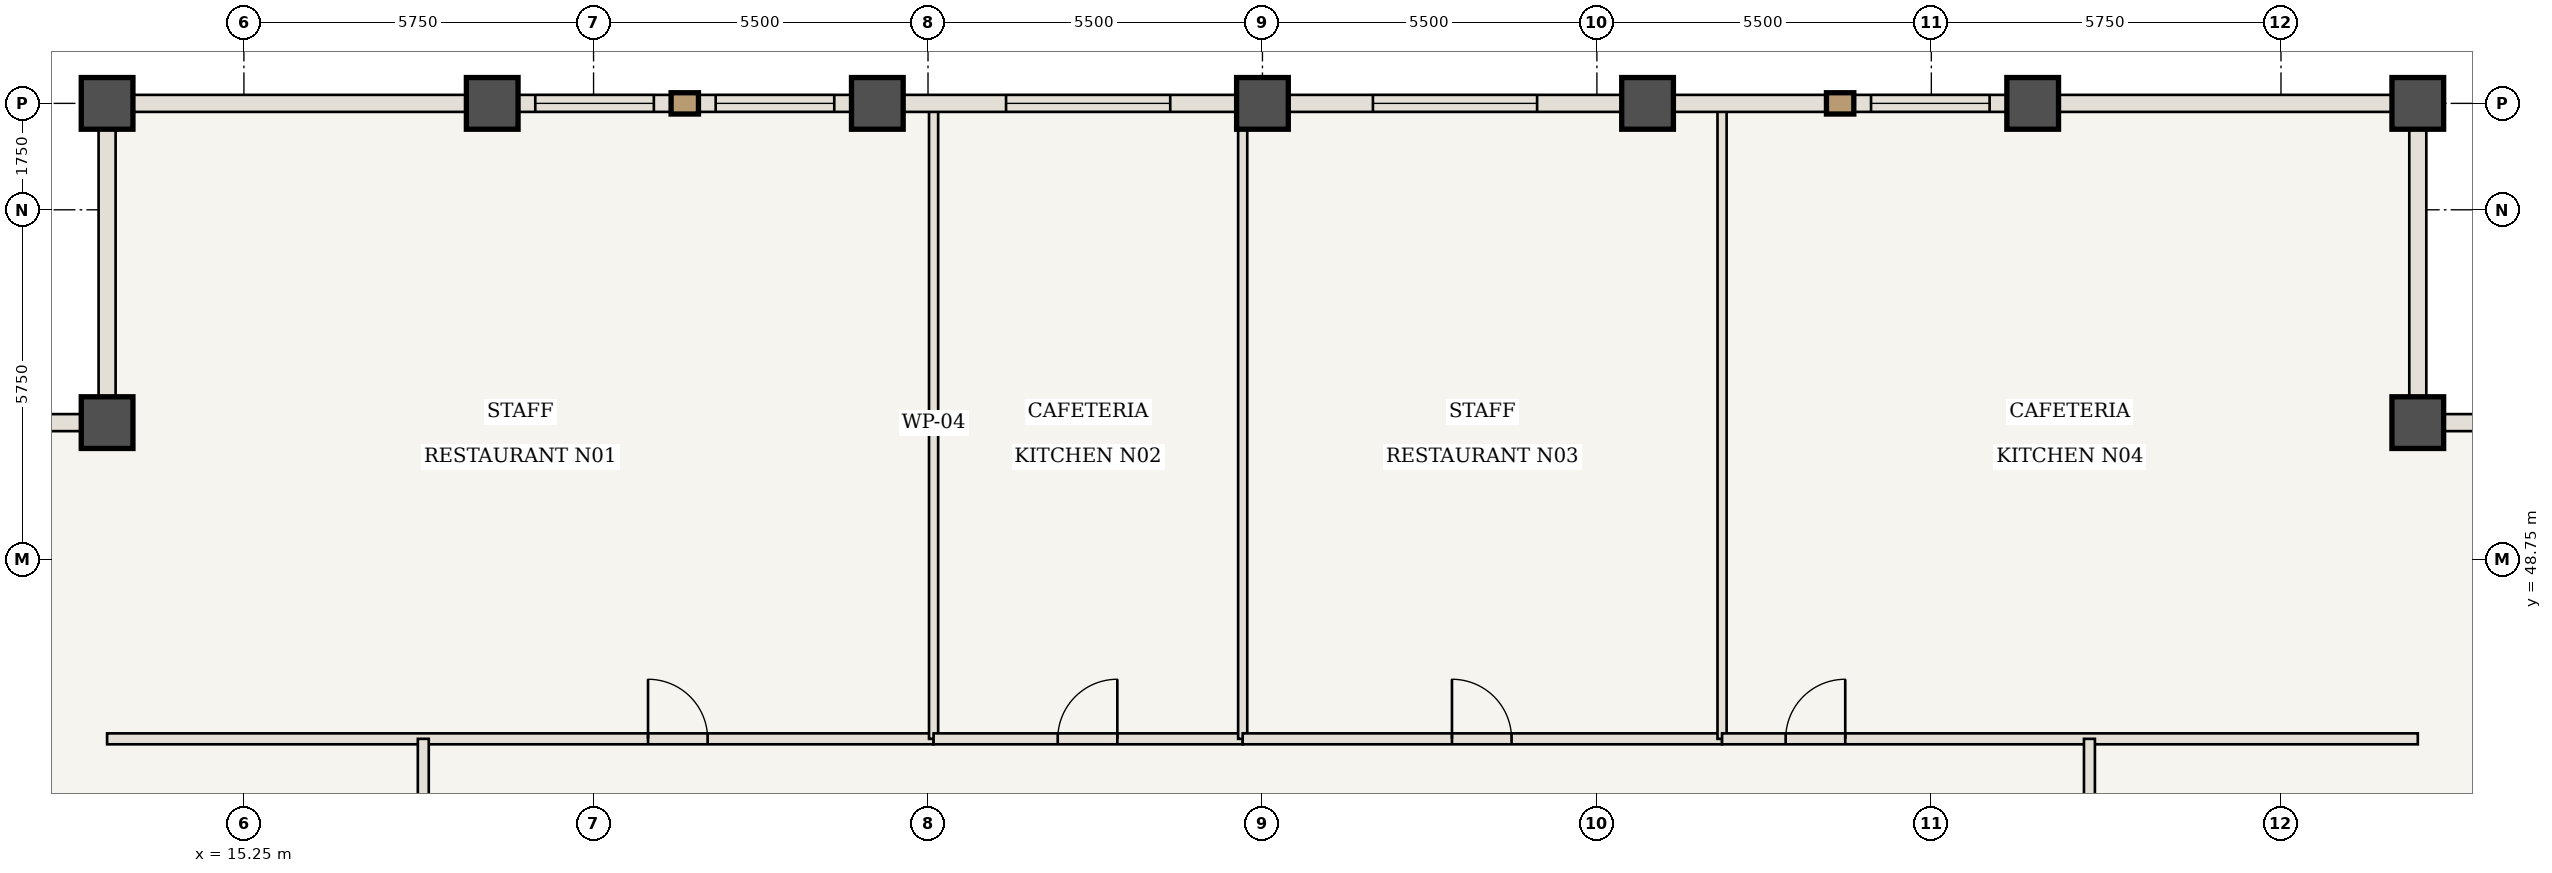
"""IFC4 building model, lengths in metres.
Left out: names, types, materials, properties, quantities, classifications, styles, units other than length and angle.
Written with IfcOpenShell. Run it as: python <this file> out.ifc"""

import sys

from ifc_helpers import new_model, si_unit, direction, frame, frame_2d, origin, origin_2d, place, context, subcontext, project, spatial, rectangle, extrude, element, fill, save


model = new_model("IFC4")
c1 = context("Model", 3, precision=1e-05, world=origin(), true_north=direction((0.0, 1.0)))
c2 = subcontext(c1, "Body", "Model", "MODEL_VIEW")
j1 = project(units=[si_unit("LENGTHUNIT", "METRE"), si_unit("PLANEANGLEUNIT", "RADIAN")], contexts=[c1])
p1 = place(None, origin())
s1 = spatial("IfcSite", under=j1, at=p1, CompositionType="ELEMENT")
p2 = place(p1, origin())
s2 = spatial("IfcBuilding", under=s1, at=p2, CompositionType="ELEMENT")
p3 = place(p2, frame((0.0, 0.0, 248.5)))
s3 = spatial("IfcBuildingStorey", under=s2, at=p3, CompositionType="ELEMENT", Elevation=248.5)
for number, where, z_axis, x_axis in (
    (1, (51.0, 51.0, 0.0), (0.0, 0.0, 1.0), (1.0, 0.0, 0.0)),
    (2, (51.0, 56.25, 0.0), (0.0, 0.0, 1.0), (1.0, 0.0, 0.0)),
    (3, (13.0, 56.25, 0.0), (0.0, 0.0, 1.0), (1.0, 0.0, 0.0)),
    (4, (13.0, 51.0, 0.0), (0.0, 0.0, 1.0), (1.0, 0.0, 0.0)),
    (5, (19.333, 56.25, 0.0), (0.0, 0.0, 1.0), (1.0, 0.0, 0.0)),
    (6, (25.667, 56.25, 0.0), (0.0, 0.0, 1.0), (1.0, 0.0, 0.0)),
    (7, (32.0, 56.25, 0.0), (0.0, 0.0, 1.0), (1.0, 0.0, 0.0)),
    (8, (38.333, 56.25, 0.0), (0.0, 0.0, 1.0), (1.0, 0.0, 0.0)),
    (9, (44.667, 56.25, 0.0), (0.0, 0.0, 1.0), (1.0, 0.0, 0.0)),
):
    element("IfcColumn", number, at=place(p3, frame(where, z_axis=z_axis, x_axis=x_axis)), inside=s3, PredefinedType="COLUMN", context=c2, shape_type="SweptSolid", body=[
        extrude(rectangle(XDim=0.85, YDim=0.85, at=origin_2d()), origin(), (0.0, 0.0, 1.0), 3.85),
    ])
p4 = place(p3, frame((13.0, 45.8, 0.0), z_axis=(0.0, 0.0, 1.0), x_axis=(1.0, 0.0, 0.0)))
e10 = element("IfcWall", 10, at=p4, inside=s3, PredefinedType="STANDARD", context=c2, shape_type="SweptSolid", body=[
    extrude(rectangle(XDim=13.592, YDim=0.18, at=frame_2d((6.796, 0.0))), origin(), (0.0, 0.0, 1.0), 3.43),
])
p5 = place(p4, frame((8.896, 0.0, 0.0)))
e11 = element("IfcOpeningElement", 11, at=p5, cuts=e10, PredefinedType="OPENING", context=c2, shape_type="SweptSolid", body=[
    extrude(rectangle(XDim=0.98, YDim=2.2, at=frame_2d((0.49, 1.1))), frame((0.0, 0.1, 0.0), z_axis=(0.0, -1.0, 0.0), x_axis=(1.0, 0.0, 0.0)), (0.0, 0.0, 1.0), 0.2),
])
p6 = place(p3, frame((26.592, 45.8, 0.0), z_axis=(0.0, 0.0, 1.0), x_axis=(0.0, 1.0, 0.0)))
e12 = element("IfcWall", 12, at=p6, inside=s3, PredefinedType="STANDARD", context=c2, shape_type="SweptSolid", body=[
    extrude(rectangle(XDim=10.39, YDim=0.15, at=frame_2d((5.195, 0.0))), origin(), (0.0, 0.0, 1.0), 3.43),
])
p7 = place(p3, frame((26.592, 45.8, 0.0), z_axis=(0.0, 0.0, 1.0), x_axis=(1.0, 0.0, 0.0)))
e13 = element("IfcWall", 13, at=p7, inside=s3, PredefinedType="STANDARD", context=c2, shape_type="SweptSolid", body=[
    extrude(rectangle(XDim=5.083, YDim=0.18, at=frame_2d((2.542, 0.0))), origin(), (0.0, 0.0, 1.0), 3.43),
])
p8 = place(p7, frame((2.042, 0.0, 0.0)))
e14 = element("IfcOpeningElement", 14, at=p8, cuts=e13, PredefinedType="OPENING", context=c2, shape_type="SweptSolid", body=[
    extrude(rectangle(XDim=0.98, YDim=2.2, at=frame_2d((0.49, 1.1))), frame((0.0, 0.1, 0.0), z_axis=(0.0, -1.0, 0.0), x_axis=(1.0, 0.0, 0.0)), (0.0, 0.0, 1.0), 0.2),
])
p9 = place(p3, frame((31.675, 45.8, 0.0), z_axis=(0.0, 0.0, 1.0), x_axis=(0.0, 1.0, 0.0)))
e15 = element("IfcWall", 15, at=p9, inside=s3, PredefinedType="STANDARD", context=c2, shape_type="SweptSolid", body=[
    extrude(rectangle(XDim=10.39, YDim=0.15, at=frame_2d((5.195, 0.0))), origin(), (0.0, 0.0, 1.0), 3.43),
])
p10 = place(p3, frame((31.675, 45.8, 0.0), z_axis=(0.0, 0.0, 1.0), x_axis=(1.0, 0.0, 0.0)))
e16 = element("IfcWall", 16, at=p10, inside=s3, PredefinedType="STANDARD", context=c2, shape_type="SweptSolid", body=[
    extrude(rectangle(XDim=7.883, YDim=0.18, at=frame_2d((3.942, 0.0))), origin(), (0.0, 0.0, 1.0), 3.43),
])
p11 = place(p10, frame((3.442, 0.0, 0.0)))
e17 = element("IfcOpeningElement", 17, at=p11, cuts=e16, PredefinedType="OPENING", context=c2, shape_type="SweptSolid", body=[
    extrude(rectangle(XDim=0.98, YDim=2.2, at=frame_2d((0.49, 1.1))), frame((0.0, 0.1, 0.0), z_axis=(0.0, -1.0, 0.0), x_axis=(1.0, 0.0, 0.0)), (0.0, 0.0, 1.0), 0.2),
])
p12 = place(p3, frame((39.558, 45.8, 0.0), z_axis=(0.0, 0.0, 1.0), x_axis=(0.0, 1.0, 0.0)))
e18 = element("IfcWall", 18, at=p12, inside=s3, PredefinedType="STANDARD", context=c2, shape_type="SweptSolid", body=[
    extrude(rectangle(XDim=10.39, YDim=0.15, at=frame_2d((5.195, 0.0))), origin(), (0.0, 0.0, 1.0), 3.43),
])
p13 = place(p3, frame((39.558, 45.8, 0.0), z_axis=(0.0, 0.0, 1.0), x_axis=(1.0, 0.0, 0.0)))
e19 = element("IfcWall", 19, at=p13, inside=s3, PredefinedType="STANDARD", context=c2, shape_type="SweptSolid", body=[
    extrude(rectangle(XDim=11.442, YDim=0.18, at=frame_2d((5.721, 0.0))), origin(), (0.0, 0.0, 1.0), 3.43),
])
p14 = place(p13, frame((1.046, 0.0, 0.0)))
e20 = element("IfcOpeningElement", 20, at=p14, cuts=e19, PredefinedType="OPENING", context=c2, shape_type="SweptSolid", body=[
    extrude(rectangle(XDim=0.98, YDim=2.2, at=frame_2d((0.49, 1.1))), frame((0.0, 0.1, 0.0), z_axis=(0.0, -1.0, 0.0), x_axis=(1.0, 0.0, 0.0)), (0.0, 0.0, 1.0), 0.2),
])
p15 = place(p3, frame((18.2, 18.2, 0.0), z_axis=(0.0, 0.0, 1.0), x_axis=(0.0, 1.0, 0.0)))
e21 = element("IfcWall", 21, at=p15, inside=s3, PredefinedType="STANDARD", context=c2, shape_type="SweptSolid", body=[
    extrude(rectangle(XDim=27.6, YDim=0.18, at=frame_2d((13.8, 0.0))), origin(), (0.0, 0.0, 1.0), 3.43),
])
p16 = place(p15, frame((14.75, 0.0, 0.0)))
e22 = element("IfcOpeningElement", 22, at=p16, cuts=e21, PredefinedType="OPENING", context=c2, shape_type="SweptSolid", body=[
    extrude(rectangle(XDim=0.98, YDim=2.2, at=frame_2d((0.49, 1.1))), frame((0.0, 0.1, 0.0), z_axis=(0.0, -1.0, 0.0), x_axis=(1.0, 0.0, 0.0)), (0.0, 0.0, 1.0), 0.2),
])
p17 = place(p3, frame((45.6, 30.75, 0.0), z_axis=(0.0, 0.0, 1.0), x_axis=(0.0, 1.0, 0.0)))
e23 = element("IfcWall", 23, at=p17, inside=s3, PredefinedType="STANDARD", context=c2, shape_type="SweptSolid", body=[
    extrude(rectangle(XDim=15.05, YDim=0.18, at=frame_2d((7.525, 0.0))), origin(), (0.0, 0.0, 1.0), 3.43),
])
p18 = place(p17, frame((7.025, 0.0, 0.0)))
e24 = element("IfcOpeningElement", 24, at=p18, cuts=e23, PredefinedType="OPENING", context=c2, shape_type="SweptSolid", body=[
    extrude(rectangle(XDim=0.98, YDim=2.2, at=frame_2d((0.49, 1.1))), frame((0.0, 0.1, 0.0), z_axis=(0.0, -1.0, 0.0), x_axis=(1.0, 0.0, 0.0)), (0.0, 0.0, 1.0), 0.2),
])
p19 = place(p3, frame((13.0, 56.25, 0.0), z_axis=(0.0, 0.0, 1.0), x_axis=(1.0, 0.0, 0.0)))
e25 = element("IfcWall", 25, at=p19, inside=s3, PredefinedType="USERDEFINED", context=c2, shape_type="SweptSolid", body=[
    extrude(rectangle(XDim=6.333, YDim=0.28, at=frame_2d((3.167, 0.0))), origin(), (0.0, 0.0, 1.0), 2.73),
])
p20 = place(p3, frame((19.333, 56.25, 0.0), z_axis=(0.0, 0.0, 1.0), x_axis=(1.0, 0.0, 0.0)))
e26 = element("IfcWall", 26, at=p20, inside=s3, PredefinedType="USERDEFINED", context=c2, shape_type="SweptSolid", body=[
    extrude(rectangle(XDim=6.333, YDim=0.28, at=frame_2d((3.167, 0.0))), origin(), (0.0, 0.0, 1.0), 2.73),
])
p21 = place(p20, frame((0.708, 0.0, 0.85)))
e27 = element("IfcOpeningElement", 27, at=p21, cuts=e26, PredefinedType="OPENING", context=c2, shape_type="SweptSolid", body=[
    extrude(rectangle(XDim=1.95, YDim=1.68, at=frame_2d((0.975, 0.84))), frame((0.0, 0.15, 0.0), z_axis=(0.0, -1.0, 0.0), x_axis=(1.0, 0.0, 0.0)), (0.0, 0.0, 1.0), 0.3),
])
p22 = place(p20, frame((3.675, 0.0, 0.85)))
e28 = element("IfcOpeningElement", 28, at=p22, cuts=e26, PredefinedType="OPENING", context=c2, shape_type="SweptSolid", body=[
    extrude(rectangle(XDim=1.95, YDim=1.68, at=frame_2d((0.975, 0.84))), frame((0.0, 0.15, 0.0), z_axis=(0.0, -1.0, 0.0), x_axis=(1.0, 0.0, 0.0)), (0.0, 0.0, 1.0), 0.3),
])
p23 = place(p3, frame((25.667, 56.25, 0.0), z_axis=(0.0, 0.0, 1.0), x_axis=(1.0, 0.0, 0.0)))
e29 = element("IfcWall", 29, at=p23, inside=s3, PredefinedType="USERDEFINED", context=c2, shape_type="SweptSolid", body=[
    extrude(rectangle(XDim=6.333, YDim=0.28, at=frame_2d((3.167, 0.0))), origin(), (0.0, 0.0, 1.0), 2.73),
])
p24 = place(p23, frame((2.117, 0.0, 0.85)))
e30 = element("IfcOpeningElement", 30, at=p24, cuts=e29, PredefinedType="OPENING", context=c2, shape_type="SweptSolid", body=[
    extrude(rectangle(XDim=2.7, YDim=1.68, at=frame_2d((1.35, 0.84))), frame((0.0, 0.15, 0.0), z_axis=(0.0, -1.0, 0.0), x_axis=(1.0, 0.0, 0.0)), (0.0, 0.0, 1.0), 0.3),
])
p25 = place(p3, frame((32.0, 56.25, 0.0), z_axis=(0.0, 0.0, 1.0), x_axis=(1.0, 0.0, 0.0)))
e31 = element("IfcWall", 31, at=p25, inside=s3, PredefinedType="USERDEFINED", context=c2, shape_type="SweptSolid", body=[
    extrude(rectangle(XDim=6.333, YDim=0.28, at=frame_2d((3.167, 0.0))), origin(), (0.0, 0.0, 1.0), 2.73),
])
p26 = place(p25, frame((1.817, 0.0, 0.85)))
e32 = element("IfcOpeningElement", 32, at=p26, cuts=e31, PredefinedType="OPENING", context=c2, shape_type="SweptSolid", body=[
    extrude(rectangle(XDim=2.7, YDim=1.68, at=frame_2d((1.35, 0.84))), frame((0.0, 0.15, 0.0), z_axis=(0.0, -1.0, 0.0), x_axis=(1.0, 0.0, 0.0)), (0.0, 0.0, 1.0), 0.3),
])
p27 = place(p3, frame((38.333, 56.25, 0.0), z_axis=(0.0, 0.0, 1.0), x_axis=(1.0, 0.0, 0.0)))
e33 = element("IfcWall", 33, at=p27, inside=s3, PredefinedType="USERDEFINED", context=c2, shape_type="SweptSolid", body=[
    extrude(rectangle(XDim=6.333, YDim=0.28, at=frame_2d((3.167, 0.0))), origin(), (0.0, 0.0, 1.0), 2.73),
])
p28 = place(p27, frame((3.675, 0.0, 0.85)))
e34 = element("IfcOpeningElement", 34, at=p28, cuts=e33, PredefinedType="OPENING", context=c2, shape_type="SweptSolid", body=[
    extrude(rectangle(XDim=1.95, YDim=1.68, at=frame_2d((0.975, 0.84))), frame((0.0, 0.15, 0.0), z_axis=(0.0, -1.0, 0.0), x_axis=(1.0, 0.0, 0.0)), (0.0, 0.0, 1.0), 0.3),
])
p29 = place(p3, frame((44.667, 56.25, 0.0), z_axis=(0.0, 0.0, 1.0), x_axis=(1.0, 0.0, 0.0)))
e35 = element("IfcWall", 35, at=p29, inside=s3, PredefinedType="USERDEFINED", context=c2, shape_type="SweptSolid", body=[
    extrude(rectangle(XDim=6.333, YDim=0.28, at=frame_2d((3.167, 0.0))), origin(), (0.0, 0.0, 1.0), 2.73),
])
for number, where, z_axis, x_axis in (
    (36, (51.0, 51.0, 0.0), (0.0, 0.0, 1.0), (1.0, 0.0, 0.0)),
    (37, (51.0, 56.25, 0.0), (0.0, 0.0, 1.0), (0.0, -1.0, 0.0)),
    (38, (13.0, 51.0, 0.0), (0.0, 0.0, 1.0), (0.0, 1.0, 0.0)),
    (39, (7.75, 51.0, 0.0), (0.0, 0.0, 1.0), (1.0, 0.0, 0.0)),
):
    element("IfcWall", number, at=place(p3, frame(where, z_axis=z_axis, x_axis=x_axis)), inside=s3, PredefinedType="USERDEFINED", context=c2, shape_type="SweptSolid", body=[
        extrude(rectangle(XDim=5.25, YDim=0.28, at=frame_2d((2.625, 0.0))), origin(), (0.0, 0.0, 1.0), 2.73),
    ])
p30 = place(p5, origin())
e40 = element("IfcDoor", 40, at=p30, inside=s3, OperationType="SINGLE_SWING_LEFT", PredefinedType="DOOR", context=c2, shape_type="SweptSolid", body=[
    extrude(rectangle(XDim=0.98, YDim=2.2, at=frame_2d((0.49, 1.1))), frame((0.0, 0.025, 0.0), z_axis=(0.0, -1.0, 0.0), x_axis=(1.0, 0.0, 0.0)), (0.0, 0.0, 1.0), 0.05),
])
fill(e11, e40)
p31 = place(p8, origin())
e41 = element("IfcDoor", 41, at=p31, inside=s3, OperationType="SINGLE_SWING_RIGHT", PredefinedType="DOOR", context=c2, shape_type="SweptSolid", body=[
    extrude(rectangle(XDim=0.98, YDim=2.2, at=frame_2d((0.49, 1.1))), frame((0.0, 0.025, 0.0), z_axis=(0.0, -1.0, 0.0), x_axis=(1.0, 0.0, 0.0)), (0.0, 0.0, 1.0), 0.05),
])
fill(e14, e41)
p32 = place(p11, origin())
e42 = element("IfcDoor", 42, at=p32, inside=s3, OperationType="SINGLE_SWING_LEFT", PredefinedType="DOOR", context=c2, shape_type="SweptSolid", body=[
    extrude(rectangle(XDim=0.98, YDim=2.2, at=frame_2d((0.49, 1.1))), frame((0.0, 0.025, 0.0), z_axis=(0.0, -1.0, 0.0), x_axis=(1.0, 0.0, 0.0)), (0.0, 0.0, 1.0), 0.05),
])
fill(e17, e42)
p33 = place(p14, origin())
e43 = element("IfcDoor", 43, at=p33, inside=s3, OperationType="SINGLE_SWING_RIGHT", PredefinedType="DOOR", context=c2, shape_type="SweptSolid", body=[
    extrude(rectangle(XDim=0.98, YDim=2.2, at=frame_2d((0.49, 1.1))), frame((0.0, 0.025, 0.0), z_axis=(0.0, -1.0, 0.0), x_axis=(1.0, 0.0, 0.0)), (0.0, 0.0, 1.0), 0.05),
])
fill(e20, e43)
p34 = place(p21, origin())
e44 = element("IfcWindow", 44, at=p34, inside=s3, PartitioningType="SINGLE_PANEL", PredefinedType="WINDOW", context=c2, shape_type="SweptSolid", body=[
    extrude(rectangle(XDim=1.95, YDim=1.68, at=frame_2d((0.975, 0.84))), frame((0.0, 0.03, 0.0), z_axis=(0.0, -1.0, 0.0), x_axis=(1.0, 0.0, 0.0)), (0.0, 0.0, 1.0), 0.06),
])
fill(e27, e44)
p35 = place(p22, origin())
e45 = element("IfcWindow", 45, at=p35, inside=s3, PartitioningType="SINGLE_PANEL", PredefinedType="WINDOW", context=c2, shape_type="SweptSolid", body=[
    extrude(rectangle(XDim=1.95, YDim=1.68, at=frame_2d((0.975, 0.84))), frame((0.0, 0.03, 0.0), z_axis=(0.0, -1.0, 0.0), x_axis=(1.0, 0.0, 0.0)), (0.0, 0.0, 1.0), 0.06),
])
fill(e28, e45)
p36 = place(p24, origin())
e46 = element("IfcWindow", 46, at=p36, inside=s3, PartitioningType="SINGLE_PANEL", PredefinedType="WINDOW", context=c2, shape_type="SweptSolid", body=[
    extrude(rectangle(XDim=2.7, YDim=1.68, at=frame_2d((1.35, 0.84))), frame((0.0, 0.03, 0.0), z_axis=(0.0, -1.0, 0.0), x_axis=(1.0, 0.0, 0.0)), (0.0, 0.0, 1.0), 0.06),
])
fill(e30, e46)
p37 = place(p26, origin())
e47 = element("IfcWindow", 47, at=p37, inside=s3, PartitioningType="SINGLE_PANEL", PredefinedType="WINDOW", context=c2, shape_type="SweptSolid", body=[
    extrude(rectangle(XDim=2.7, YDim=1.68, at=frame_2d((1.35, 0.84))), frame((0.0, 0.03, 0.0), z_axis=(0.0, -1.0, 0.0), x_axis=(1.0, 0.0, 0.0)), (0.0, 0.0, 1.0), 0.06),
])
fill(e32, e47)
p38 = place(p28, origin())
e48 = element("IfcWindow", 48, at=p38, inside=s3, PartitioningType="SINGLE_PANEL", PredefinedType="WINDOW", context=c2, shape_type="SweptSolid", body=[
    extrude(rectangle(XDim=1.95, YDim=1.68, at=frame_2d((0.975, 0.84))), frame((0.0, 0.03, 0.0), z_axis=(0.0, -1.0, 0.0), x_axis=(1.0, 0.0, 0.0)), (0.0, 0.0, 1.0), 0.06),
])
fill(e34, e48)
save(model, sys.argv[1])
